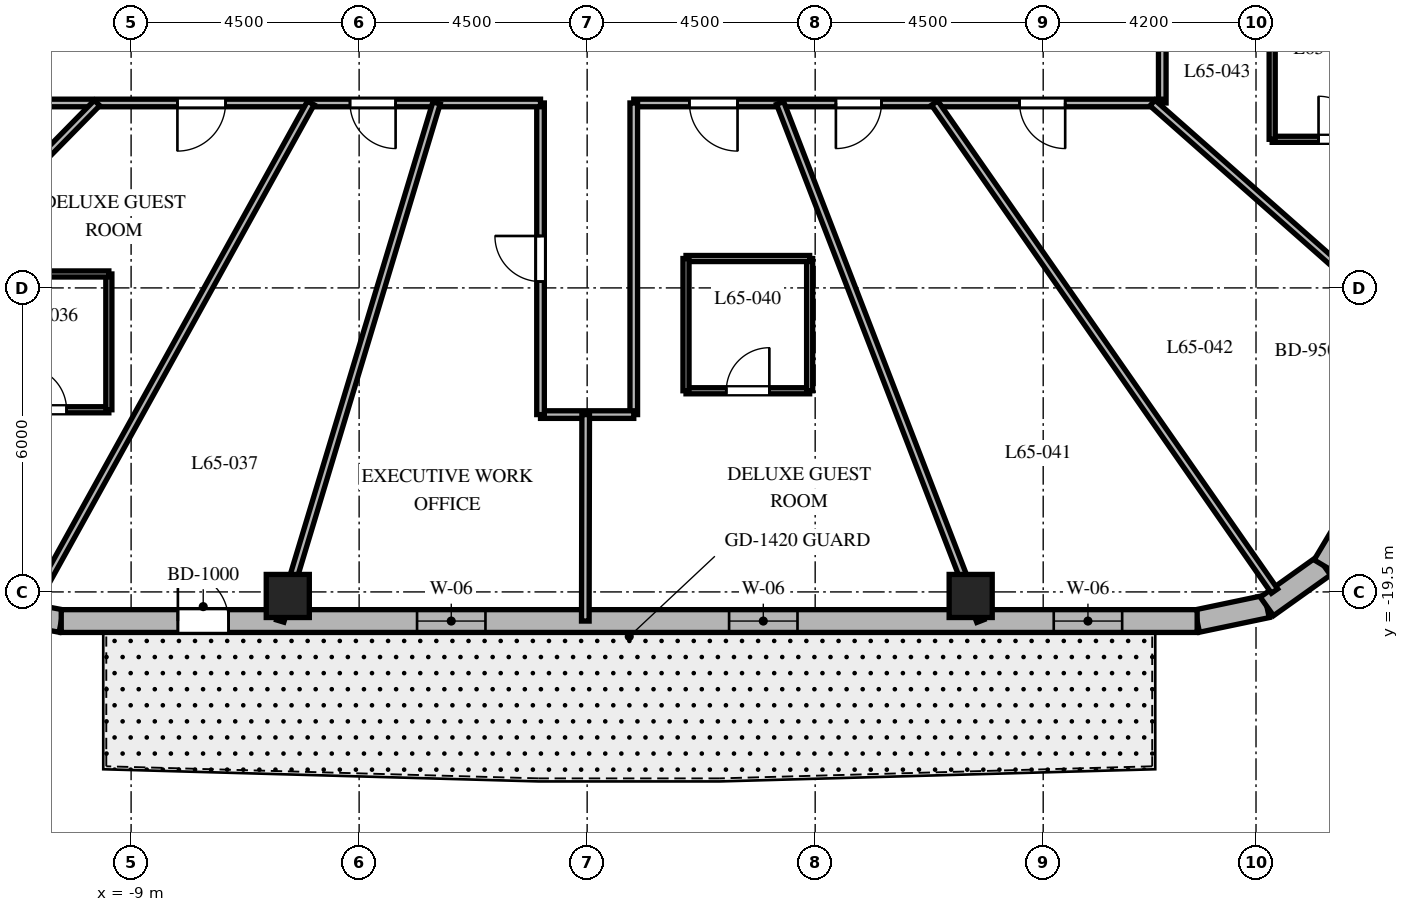
"""IFC4 building model, lengths in metres.
Left out: names, types, materials, properties, quantities, classifications, styles, units other than length and angle.
Written with IfcOpenShell. Run it as: python <this file> out.ifc"""

import sys

from ifc_helpers import new_model, si_unit, direction, frame, frame_2d, origin, origin_2d, place, context, subcontext, project, spatial, rectangle, extrude, element, fill, save


model = new_model("IFC4")
c1 = context("Model", 3, precision=1e-05, world=origin(), true_north=direction((0.0, 1.0)))
c2 = subcontext(c1, "Body", "Model", "MODEL_VIEW")
j1 = project(units=[si_unit("LENGTHUNIT", "METRE"), si_unit("PLANEANGLEUNIT", "RADIAN")], contexts=[c1])
p1 = place(None, origin())
s1 = spatial("IfcSite", under=j1, at=p1, CompositionType="ELEMENT")
p2 = place(p1, origin())
s2 = spatial("IfcBuilding", under=s1, at=p2, CompositionType="ELEMENT")
p3 = place(p2, frame((0.0, 0.0, 261.3)))
s3 = spatial("IfcBuildingStorey", under=s2, at=p3, CompositionType="ELEMENT", Elevation=261.3)
for number, where, z_axis, x_axis in (
    (1, (-5.908, -19.58, 0.0), (0.0, 0.0, 1.0), (1.0, 0.0, 0.0)),
    (2, (7.569, -19.58, 0.0), (0.0, 0.0, 1.0), (1.0, 0.0, 0.0)),
):
    element("IfcColumn", number, at=place(p3, frame(where, z_axis=z_axis, x_axis=x_axis)), inside=s3, PredefinedType="COLUMN", context=c2, shape_type="SweptSolid", body=[
        extrude(rectangle(XDim=0.85, YDim=0.85, at=origin_2d()), origin(), (0.0, 0.0, 1.0), 3.9),
    ])
p4 = place(p3, frame((-11.626, -19.84, 0.0), z_axis=(0.0, 0.0, 1.0), x_axis=(0.982701956681, -0.185194126083, 0.0)))
e3 = element("IfcWall", 3, at=p4, inside=s3, PredefinedType="SOLIDWALL", context=c2, shape_type="SweptSolid", body=[
    extrude(rectangle(XDim=1.27, YDim=0.45, at=frame_2d((0.635, 0.0))), origin(), (0.0, 0.0, 1.0), 3.6),
])
p5 = place(p3, frame((12.038, -20.075, 0.0), z_axis=(0.0, 0.0, 1.0), x_axis=(0.978750122553, 0.205056571711, 0.0)))
e4 = element("IfcWall", 4, at=p5, inside=s3, PredefinedType="SOLIDWALL", context=c2, shape_type="SweptSolid", body=[
    extrude(rectangle(XDim=1.406, YDim=0.45, at=frame_2d((0.703, 0.0))), origin(), (0.0, 0.0, 1.0), 3.6),
])
p6 = place(p3, frame((13.415, -19.787, 0.0), z_axis=(0.0, 0.0, 1.0), x_axis=(0.814055493997, 0.580787097561, 0.0)))
e5 = element("IfcWall", 5, at=p6, inside=s3, PredefinedType="SOLIDWALL", context=c2, shape_type="SweptSolid", body=[
    extrude(rectangle(XDim=1.383, YDim=0.45, at=frame_2d((0.691, 0.0))), origin(), (0.0, 0.0, 1.0), 3.6),
])
p7 = place(p3, frame((14.54, -18.984, 0.0), z_axis=(0.0, 0.0, 1.0), x_axis=(0.512374906623, 0.858761873317, 0.0)))
e6 = element("IfcWall", 6, at=p7, inside=s3, PredefinedType="SOLIDWALL", context=c2, shape_type="SweptSolid", body=[
    extrude(rectangle(XDim=1.406, YDim=0.45, at=frame_2d((0.703, 0.0))), origin(), (0.0, 0.0, 1.0), 3.6),
])
p8 = place(p3, frame((-10.379, -20.075, 0.0), z_axis=(0.0, 0.0, 1.0), x_axis=(1.0, 0.0, 0.0)))
e7 = element("IfcWall", 7, at=p8, inside=s3, PredefinedType="SOLIDWALL", context=c2, shape_type="SweptSolid", body=[
    extrude(rectangle(XDim=22.417, YDim=0.45, at=frame_2d((11.208, 0.0))), origin(), (0.0, 0.0, 1.0), 3.6),
])
p9 = place(p8, frame((2.302, 0.0, 0.0)))
e8 = element("IfcOpeningElement", 8, at=p9, cuts=e7, PredefinedType="OPENING", context=c2, shape_type="SweptSolid", body=[
    extrude(rectangle(XDim=1.0, YDim=2.15, at=frame_2d((0.5, 1.075))), frame((0.0, 0.235, 0.0), z_axis=(0.0, -1.0, 0.0), x_axis=(1.0, 0.0, 0.0)), (0.0, 0.0, 1.0), 0.47),
])
p10 = place(p8, frame((7.022, 0.0, 0.8)))
e9 = element("IfcOpeningElement", 9, at=p10, cuts=e7, PredefinedType="OPENING", context=c2, shape_type="SweptSolid", body=[
    extrude(rectangle(XDim=1.35, YDim=1.75, at=frame_2d((0.675, 0.875))), frame((0.0, 0.235, 0.0), z_axis=(0.0, -1.0, 0.0), x_axis=(1.0, 0.0, 0.0)), (0.0, 0.0, 1.0), 0.47),
])
p11 = place(p8, frame((13.18, 0.0, 0.8)))
e10 = element("IfcOpeningElement", 10, at=p11, cuts=e7, PredefinedType="OPENING", context=c2, shape_type="SweptSolid", body=[
    extrude(rectangle(XDim=1.35, YDim=1.75, at=frame_2d((0.675, 0.875))), frame((0.0, 0.235, 0.0), z_axis=(0.0, -1.0, 0.0), x_axis=(1.0, 0.0, 0.0)), (0.0, 0.0, 1.0), 0.47),
])
p12 = place(p8, frame((19.587, 0.0, 0.8)))
e11 = element("IfcOpeningElement", 11, at=p12, cuts=e7, PredefinedType="OPENING", context=c2, shape_type="SweptSolid", body=[
    extrude(rectangle(XDim=1.35, YDim=1.75, at=frame_2d((0.675, 0.875))), frame((0.0, 0.235, 0.0), z_axis=(0.0, -1.0, 0.0), x_axis=(1.0, 0.0, 0.0)), (0.0, 0.0, 1.0), 0.47),
])
p13 = place(p3, frame((11.35, -4.4, 0.0), z_axis=(0.0, 0.0, 1.0), x_axis=(0.0, -1.0, 0.0)))
e12 = element("IfcWall", 12, at=p13, inside=s3, PredefinedType="PARTITIONING", context=c2, shape_type="SweptSolid", body=[
    extrude(rectangle(XDim=5.45, YDim=0.15, at=frame_2d((2.725, 0.0))), origin(), (0.0, 0.0, 1.0), 3.09),
])
p14 = place(p13, frame((2.458, 0.0, 0.0)))
e13 = element("IfcOpeningElement", 13, at=p14, cuts=e12, PredefinedType="OPENING", context=c2, shape_type="SweptSolid", body=[
    extrude(rectangle(XDim=0.95, YDim=2.03, at=frame_2d((0.475, 1.015))), frame((0.0, 0.085, 0.0), z_axis=(0.0, -1.0, 0.0), x_axis=(1.0, 0.0, 0.0)), (0.0, 0.0, 1.0), 0.17),
])
p15 = place(p3, frame((11.35, -9.85, 0.0), z_axis=(0.0, 0.0, 1.0), x_axis=(-1.0, 0.0, 0.0)))
e14 = element("IfcWall", 14, at=p15, inside=s3, PredefinedType="PARTITIONING", context=c2, shape_type="SweptSolid", body=[
    extrude(rectangle(XDim=10.43, YDim=0.15, at=frame_2d((5.215, 0.0))), origin(), (0.0, 0.0, 1.0), 3.09),
])
p16 = place(p15, frame((8.382, 0.0, 0.0)))
e15 = element("IfcOpeningElement", 15, at=p16, cuts=e14, PredefinedType="OPENING", context=c2, shape_type="SweptSolid", body=[
    extrude(rectangle(XDim=0.95, YDim=2.03, at=frame_2d((0.475, 1.015))), frame((0.0, 0.085, 0.0), z_axis=(0.0, -1.0, 0.0), x_axis=(1.0, 0.0, 0.0)), (0.0, 0.0, 1.0), 0.17),
])
p17 = place(p15, frame((5.541, 0.0, 0.0)))
e16 = element("IfcOpeningElement", 16, at=p17, cuts=e14, PredefinedType="OPENING", context=c2, shape_type="SweptSolid", body=[
    extrude(rectangle(XDim=0.9, YDim=2.03, at=frame_2d((0.45, 1.015))), frame((0.0, 0.085, 0.0), z_axis=(0.0, -1.0, 0.0), x_axis=(1.0, 0.0, 0.0)), (0.0, 0.0, 1.0), 0.17),
])
p18 = place(p15, frame((1.916, 0.0, 0.0)))
e17 = element("IfcOpeningElement", 17, at=p18, cuts=e14, PredefinedType="OPENING", context=c2, shape_type="SweptSolid", body=[
    extrude(rectangle(XDim=0.9, YDim=2.03, at=frame_2d((0.45, 1.015))), frame((0.0, 0.085, 0.0), z_axis=(0.0, -1.0, 0.0), x_axis=(1.0, 0.0, 0.0)), (0.0, 0.0, 1.0), 0.17),
])
p19 = place(p3, frame((0.92, -9.85, 0.0), z_axis=(0.0, 0.0, 1.0), x_axis=(0.0, -1.0, 0.0)))
e18 = element("IfcWall", 18, at=p19, inside=s3, PredefinedType="PARTITIONING", context=c2, shape_type="SweptSolid", body=[
    extrude(rectangle(XDim=6.15, YDim=0.15, at=frame_2d((3.075, 0.0))), origin(), (0.0, 0.0, 1.0), 3.041),
])
p20 = place(p3, frame((0.92, -16.0, 0.0), z_axis=(0.0, 0.0, 1.0), x_axis=(-1.0, 0.0, 0.0)))
e19 = element("IfcWall", 19, at=p20, inside=s3, PredefinedType="PARTITIONING", context=c2, shape_type="SweptSolid", body=[
    extrude(rectangle(XDim=1.84, YDim=0.15, at=frame_2d((0.92, 0.0))), origin(), (0.0, 0.0, 1.0), 3.6),
])
p21 = place(p3, frame((-0.92, -16.0, 0.0), z_axis=(0.0, 0.0, 1.0), x_axis=(0.0, 1.0, 0.0)))
e20 = element("IfcWall", 20, at=p21, inside=s3, PredefinedType="PARTITIONING", context=c2, shape_type="SweptSolid", body=[
    extrude(rectangle(XDim=6.15, YDim=0.15, at=frame_2d((3.075, 0.0))), origin(), (0.0, 0.0, 1.0), 3.041),
])
p22 = place(p21, frame((2.625, 0.0, 0.0)))
e21 = element("IfcOpeningElement", 21, at=p22, cuts=e20, PredefinedType="OPENING", context=c2, shape_type="SweptSolid", body=[
    extrude(rectangle(XDim=0.9, YDim=2.03, at=frame_2d((0.45, 1.015))), frame((0.0, 0.085, 0.0), z_axis=(0.0, -1.0, 0.0), x_axis=(1.0, 0.0, 0.0)), (0.0, 0.0, 1.0), 0.17),
])
p23 = place(p3, frame((-0.92, -9.85, 0.0), z_axis=(0.0, 0.0, 1.0), x_axis=(-1.0, 0.0, 0.0)))
e22 = element("IfcWall", 22, at=p23, inside=s3, PredefinedType="PARTITIONING", context=c2, shape_type="SweptSolid", body=[
    extrude(rectangle(XDim=10.43, YDim=0.15, at=frame_2d((5.215, 0.0))), origin(), (0.0, 0.0, 1.0), 3.09),
])
p24 = place(p23, frame((6.216, 0.0, 0.0)))
e23 = element("IfcOpeningElement", 23, at=p24, cuts=e22, PredefinedType="OPENING", context=c2, shape_type="SweptSolid", body=[
    extrude(rectangle(XDim=0.95, YDim=2.03, at=frame_2d((0.475, 1.015))), frame((0.0, 0.085, 0.0), z_axis=(0.0, -1.0, 0.0), x_axis=(1.0, 0.0, 0.0)), (0.0, 0.0, 1.0), 0.17),
])
p25 = place(p23, frame((2.86, 0.0, 0.0)))
e24 = element("IfcOpeningElement", 24, at=p25, cuts=e22, PredefinedType="OPENING", context=c2, shape_type="SweptSolid", body=[
    extrude(rectangle(XDim=0.9, YDim=2.03, at=frame_2d((0.45, 1.015))), frame((0.0, 0.085, 0.0), z_axis=(0.0, -1.0, 0.0), x_axis=(1.0, 0.0, 0.0)), (0.0, 0.0, 1.0), 0.17),
])
p26 = place(p3, frame((-9.672, -9.85, 0.0), z_axis=(0.0, 0.0, 1.0), x_axis=(-0.700629771301, -0.713524998558, 0.0)))
e25 = element("IfcWall", 25, at=p26, inside=s3, PredefinedType="PARTITIONING", context=c2, shape_type="SweptSolid", body=[
    extrude(rectangle(XDim=7.459, YDim=0.15, at=frame_2d((3.73, 0.0))), origin(), (0.0, 0.0, 1.0), 2.94),
])
p27 = place(p3, frame((-5.454, -9.85, 0.0), z_axis=(0.0, 0.0, 1.0), x_axis=(-0.48439420613, -0.874849846012, 0.0)))
e26 = element("IfcWall", 26, at=p27, inside=s3, PredefinedType="PARTITIONING", context=c2, shape_type="SweptSolid", body=[
    extrude(rectangle(XDim=11.375, YDim=0.15, at=frame_2d((5.688, 0.0))), origin(), (0.0, 0.0, 1.0), 2.94),
])
p28 = place(p3, frame((-2.972, -9.85, 0.0), z_axis=(0.0, 0.0, 1.0), x_axis=(-0.288872169679, -0.957367677324, 0.0)))
e27 = element("IfcWall", 27, at=p28, inside=s3, PredefinedType="PARTITIONING", context=c2, shape_type="SweptSolid", body=[
    extrude(rectangle(XDim=10.68, YDim=0.15, at=frame_2d((5.34, 0.0))), origin(), (0.0, 0.0, 1.0), 2.94),
])
p29 = place(p3, frame((-0.029, -16.0, 0.0), z_axis=(0.0, 0.0, 1.0), x_axis=(-0.001797372928, -0.999998384724, 0.0)))
e28 = element("IfcWall", 28, at=p29, inside=s3, PredefinedType="PARTITIONING", context=c2, shape_type="SweptSolid", body=[
    extrude(rectangle(XDim=4.075, YDim=0.15, at=frame_2d((2.038, 0.0))), origin(), (0.0, 0.0, 1.0), 2.94),
])
p30 = place(p3, frame((3.808, -9.85, 0.0), z_axis=(0.0, 0.0, 1.0), x_axis=(0.360587327934, -0.932725457427, 0.0)))
e29 = element("IfcWall", 29, at=p30, inside=s3, PredefinedType="PARTITIONING", context=c2, shape_type="SweptSolid", body=[
    extrude(rectangle(XDim=10.962, YDim=0.15, at=frame_2d((5.481, 0.0))), origin(), (0.0, 0.0, 1.0), 2.94),
])
p31 = place(p3, frame((6.858, -9.85, 0.0), z_axis=(0.0, 0.0, 1.0), x_axis=(0.571391702066, -0.820677477948, 0.0)))
e30 = element("IfcWall", 30, at=p31, inside=s3, PredefinedType="PARTITIONING", context=c2, shape_type="SweptSolid", body=[
    extrude(rectangle(XDim=11.738, YDim=0.15, at=frame_2d((5.869, 0.0))), origin(), (0.0, 0.0, 1.0), 2.94),
])
p32 = place(p3, frame((11.157, -9.85, 0.0), z_axis=(0.0, 0.0, 1.0), x_axis=(0.74966962095, -0.661812253909, 0.0)))
e31 = element("IfcWall", 31, at=p32, inside=s3, PredefinedType="PARTITIONING", context=c2, shape_type="SweptSolid", body=[
    extrude(rectangle(XDim=6.989, YDim=0.15, at=frame_2d((3.494, 0.0))), origin(), (0.0, 0.0, 1.0), 2.94),
])
p33 = place(p3, frame((-11.959, -15.905, 0.0), z_axis=(0.0, 0.0, 1.0), x_axis=(1.0, 0.0, 0.0)))
e32 = element("IfcWall", 32, at=p33, inside=s3, PredefinedType="PARTITIONING", context=c2, shape_type="SweptSolid", body=[
    extrude(rectangle(XDim=2.52, YDim=0.12, at=frame_2d((1.26, 0.0))), origin(), (0.0, 0.0, 1.0), 3.6),
])
p34 = place(p33, frame((0.835, 0.0, 0.0)))
e33 = element("IfcOpeningElement", 33, at=p34, cuts=e32, PredefinedType="OPENING", context=c2, shape_type="SweptSolid", body=[
    extrude(rectangle(XDim=0.85, YDim=2.03, at=frame_2d((0.425, 1.015))), frame((0.0, 0.07, 0.0), z_axis=(0.0, -1.0, 0.0), x_axis=(1.0, 0.0, 0.0)), (0.0, 0.0, 1.0), 0.14),
])
p35 = place(p3, frame((-9.439, -15.905, 0.0), z_axis=(0.0, 0.0, 1.0), x_axis=(0.0, 1.0, 0.0)))
e34 = element("IfcWall", 34, at=p35, inside=s3, PredefinedType="PARTITIONING", context=c2, shape_type="SweptSolid", body=[
    extrude(rectangle(XDim=2.68, YDim=0.12, at=frame_2d((1.34, 0.0))), origin(), (0.0, 0.0, 1.0), 3.172),
])
p36 = place(p3, frame((-9.439, -13.225, 0.0), z_axis=(0.0, 0.0, 1.0), x_axis=(-1.0, 0.0, 0.0)))
e35 = element("IfcWall", 35, at=p36, inside=s3, PredefinedType="PARTITIONING", context=c2, shape_type="SweptSolid", body=[
    extrude(rectangle(XDim=2.52, YDim=0.12, at=frame_2d((1.26, 0.0))), origin(), (0.0, 0.0, 1.0), 3.172),
])
p37 = place(p3, frame((1.951, -15.53, 0.0), z_axis=(0.0, 0.0, 1.0), x_axis=(1.0, 0.0, 0.0)))
e36 = element("IfcWall", 36, at=p37, inside=s3, PredefinedType="PARTITIONING", context=c2, shape_type="SweptSolid", body=[
    extrude(rectangle(XDim=2.44, YDim=0.12, at=frame_2d((1.22, 0.0))), origin(), (0.0, 0.0, 1.0), 3.041),
])
p38 = place(p37, frame((0.795, 0.0, 0.0)))
e37 = element("IfcOpeningElement", 37, at=p38, cuts=e36, PredefinedType="OPENING", context=c2, shape_type="SweptSolid", body=[
    extrude(rectangle(XDim=0.85, YDim=2.03, at=frame_2d((0.425, 1.015))), frame((0.0, 0.07, 0.0), z_axis=(0.0, -1.0, 0.0), x_axis=(1.0, 0.0, 0.0)), (0.0, 0.0, 1.0), 0.14),
])
p39 = place(p3, frame((4.391, -15.53, 0.0), z_axis=(0.0, 0.0, 1.0), x_axis=(0.0, 1.0, 0.0)))
e38 = element("IfcWall", 38, at=p39, inside=s3, PredefinedType="PARTITIONING", context=c2, shape_type="SweptSolid", body=[
    extrude(rectangle(XDim=2.61, YDim=0.12, at=frame_2d((1.305, 0.0))), origin(), (0.0, 0.0, 1.0), 3.126),
])
p40 = place(p3, frame((4.391, -12.92, 0.0), z_axis=(0.0, 0.0, 1.0), x_axis=(-1.0, 0.0, 0.0)))
e39 = element("IfcWall", 39, at=p40, inside=s3, PredefinedType="PARTITIONING", context=c2, shape_type="SweptSolid", body=[
    extrude(rectangle(XDim=2.44, YDim=0.12, at=frame_2d((1.22, 0.0))), origin(), (0.0, 0.0, 1.0), 3.126),
])
p41 = place(p3, frame((1.951, -12.92, 0.0), z_axis=(0.0, 0.0, 1.0), x_axis=(0.0, -1.0, 0.0)))
e40 = element("IfcWall", 40, at=p41, inside=s3, PredefinedType="PARTITIONING", context=c2, shape_type="SweptSolid", body=[
    extrude(rectangle(XDim=2.61, YDim=0.12, at=frame_2d((1.305, 0.0))), origin(), (0.0, 0.0, 1.0), 3.126),
])
p42 = place(p3, frame((13.519, -10.567, 0.0), z_axis=(0.0, 0.0, 1.0), x_axis=(1.0, 0.0, 0.0)))
e41 = element("IfcWall", 41, at=p42, inside=s3, PredefinedType="PARTITIONING", context=c2, shape_type="SweptSolid", body=[
    extrude(rectangle(XDim=2.68, YDim=0.12, at=frame_2d((1.34, 0.0))), origin(), (0.0, 0.0, 1.0), 3.172),
])
p43 = place(p42, frame((0.915, 0.0, 0.0)))
e42 = element("IfcOpeningElement", 42, at=p43, cuts=e41, PredefinedType="OPENING", context=c2, shape_type="SweptSolid", body=[
    extrude(rectangle(XDim=0.85, YDim=2.03, at=frame_2d((0.425, 1.015))), frame((0.0, 0.07, 0.0), z_axis=(0.0, -1.0, 0.0), x_axis=(1.0, 0.0, 0.0)), (0.0, 0.0, 1.0), 0.14),
])
p44 = place(p3, frame((13.519, -8.027, 0.0), z_axis=(0.0, 0.0, 1.0), x_axis=(0.0, -1.0, 0.0)))
e43 = element("IfcWall", 43, at=p44, inside=s3, PredefinedType="PARTITIONING", context=c2, shape_type="SweptSolid", body=[
    extrude(rectangle(XDim=2.54, YDim=0.12, at=frame_2d((1.27, 0.0))), origin(), (0.0, 0.0, 1.0), 3.6),
])
p45 = place(p9, origin())
e44 = element("IfcDoor", 44, at=p45, inside=s3, OperationType="SINGLE_SWING_LEFT", PredefinedType="DOOR", context=c2, shape_type="SweptSolid", body=[
    extrude(rectangle(XDim=1.0, YDim=2.15, at=frame_2d((0.5, 1.075))), frame((0.0, 0.025, 0.0), z_axis=(0.0, -1.0, 0.0), x_axis=(1.0, 0.0, 0.0)), (0.0, 0.0, 1.0), 0.05),
])
fill(e8, e44)
p46 = place(p10, origin())
e45 = element("IfcWindow", 45, at=p46, inside=s3, PartitioningType="SINGLE_PANEL", PredefinedType="WINDOW", context=c2, shape_type="SweptSolid", body=[
    extrude(rectangle(XDim=1.35, YDim=1.75, at=frame_2d((0.675, 0.875))), frame((0.0, 0.03, 0.0), z_axis=(0.0, -1.0, 0.0), x_axis=(1.0, 0.0, 0.0)), (0.0, 0.0, 1.0), 0.06),
])
fill(e9, e45)
p47 = place(p11, origin())
e46 = element("IfcWindow", 46, at=p47, inside=s3, PartitioningType="SINGLE_PANEL", PredefinedType="WINDOW", context=c2, shape_type="SweptSolid", body=[
    extrude(rectangle(XDim=1.35, YDim=1.75, at=frame_2d((0.675, 0.875))), frame((0.0, 0.03, 0.0), z_axis=(0.0, -1.0, 0.0), x_axis=(1.0, 0.0, 0.0)), (0.0, 0.0, 1.0), 0.06),
])
fill(e10, e46)
p48 = place(p12, origin())
e47 = element("IfcWindow", 47, at=p48, inside=s3, PartitioningType="SINGLE_PANEL", PredefinedType="WINDOW", context=c2, shape_type="SweptSolid", body=[
    extrude(rectangle(XDim=1.35, YDim=1.75, at=frame_2d((0.675, 0.875))), frame((0.0, 0.03, 0.0), z_axis=(0.0, -1.0, 0.0), x_axis=(1.0, 0.0, 0.0)), (0.0, 0.0, 1.0), 0.06),
])
fill(e11, e47)
p49 = place(p24, origin())
e48 = element("IfcDoor", 48, at=p49, inside=s3, OperationType="SINGLE_SWING_RIGHT", PredefinedType="DOOR", context=c2, shape_type="SweptSolid", body=[
    extrude(rectangle(XDim=0.95, YDim=2.03, at=frame_2d((0.475, 1.015))), frame((0.0, 0.025, 0.0), z_axis=(0.0, -1.0, 0.0), x_axis=(1.0, 0.0, 0.0)), (0.0, 0.0, 1.0), 0.05),
])
fill(e23, e48)
p50 = place(p34, origin())
e49 = element("IfcDoor", 49, at=p50, inside=s3, OperationType="SINGLE_SWING_LEFT", PredefinedType="DOOR", context=c2, shape_type="SweptSolid", body=[
    extrude(rectangle(XDim=0.85, YDim=2.03, at=frame_2d((0.425, 1.015))), frame((0.0, 0.025, 0.0), z_axis=(0.0, -1.0, 0.0), x_axis=(1.0, 0.0, 0.0)), (0.0, 0.0, 1.0), 0.05),
])
fill(e33, e49)
p51 = place(p25, origin())
e50 = element("IfcDoor", 50, at=p51, inside=s3, OperationType="SINGLE_SWING_LEFT", PredefinedType="DOOR", context=c2, shape_type="SweptSolid", body=[
    extrude(rectangle(XDim=0.9, YDim=2.03, at=frame_2d((0.45, 1.015))), frame((0.0, 0.025, 0.0), z_axis=(0.0, -1.0, 0.0), x_axis=(1.0, 0.0, 0.0)), (0.0, 0.0, 1.0), 0.05),
])
fill(e24, e50)
p52 = place(p22, origin())
e51 = element("IfcDoor", 51, at=p52, inside=s3, OperationType="SINGLE_SWING_RIGHT", PredefinedType="DOOR", context=c2, shape_type="SweptSolid", body=[
    extrude(rectangle(XDim=0.9, YDim=2.03, at=frame_2d((0.45, 1.015))), frame((0.0, 0.025, 0.0), z_axis=(0.0, -1.0, 0.0), x_axis=(1.0, 0.0, 0.0)), (0.0, 0.0, 1.0), 0.05),
])
fill(e21, e51)
p53 = place(p16, origin())
e52 = element("IfcDoor", 52, at=p53, inside=s3, OperationType="SINGLE_SWING_LEFT", PredefinedType="DOOR", context=c2, shape_type="SweptSolid", body=[
    extrude(rectangle(XDim=0.95, YDim=2.03, at=frame_2d((0.475, 1.015))), frame((0.0, 0.025, 0.0), z_axis=(0.0, -1.0, 0.0), x_axis=(1.0, 0.0, 0.0)), (0.0, 0.0, 1.0), 0.05),
])
fill(e15, e52)
p54 = place(p38, origin())
e53 = element("IfcDoor", 53, at=p54, inside=s3, OperationType="SINGLE_SWING_RIGHT", PredefinedType="DOOR", context=c2, shape_type="SweptSolid", body=[
    extrude(rectangle(XDim=0.85, YDim=2.03, at=frame_2d((0.425, 1.015))), frame((0.0, 0.025, 0.0), z_axis=(0.0, -1.0, 0.0), x_axis=(1.0, 0.0, 0.0)), (0.0, 0.0, 1.0), 0.05),
])
fill(e37, e53)
p55 = place(p17, origin())
e54 = element("IfcDoor", 54, at=p55, inside=s3, OperationType="SINGLE_SWING_RIGHT", PredefinedType="DOOR", context=c2, shape_type="SweptSolid", body=[
    extrude(rectangle(XDim=0.9, YDim=2.03, at=frame_2d((0.45, 1.015))), frame((0.0, 0.025, 0.0), z_axis=(0.0, -1.0, 0.0), x_axis=(1.0, 0.0, 0.0)), (0.0, 0.0, 1.0), 0.05),
])
fill(e16, e54)
p56 = place(p18, origin())
e55 = element("IfcDoor", 55, at=p56, inside=s3, OperationType="SINGLE_SWING_LEFT", PredefinedType="DOOR", context=c2, shape_type="SweptSolid", body=[
    extrude(rectangle(XDim=0.9, YDim=2.03, at=frame_2d((0.45, 1.015))), frame((0.0, 0.025, 0.0), z_axis=(0.0, -1.0, 0.0), x_axis=(1.0, 0.0, 0.0)), (0.0, 0.0, 1.0), 0.05),
])
fill(e17, e55)
p57 = place(p43, origin())
e56 = element("IfcDoor", 56, at=p57, inside=s3, OperationType="SINGLE_SWING_LEFT", PredefinedType="DOOR", context=c2, shape_type="SweptSolid", body=[
    extrude(rectangle(XDim=0.85, YDim=2.03, at=frame_2d((0.425, 1.015))), frame((0.0, 0.025, 0.0), z_axis=(0.0, -1.0, 0.0), x_axis=(1.0, 0.0, 0.0)), (0.0, 0.0, 1.0), 0.05),
])
fill(e42, e56)
save(model, sys.argv[1])
